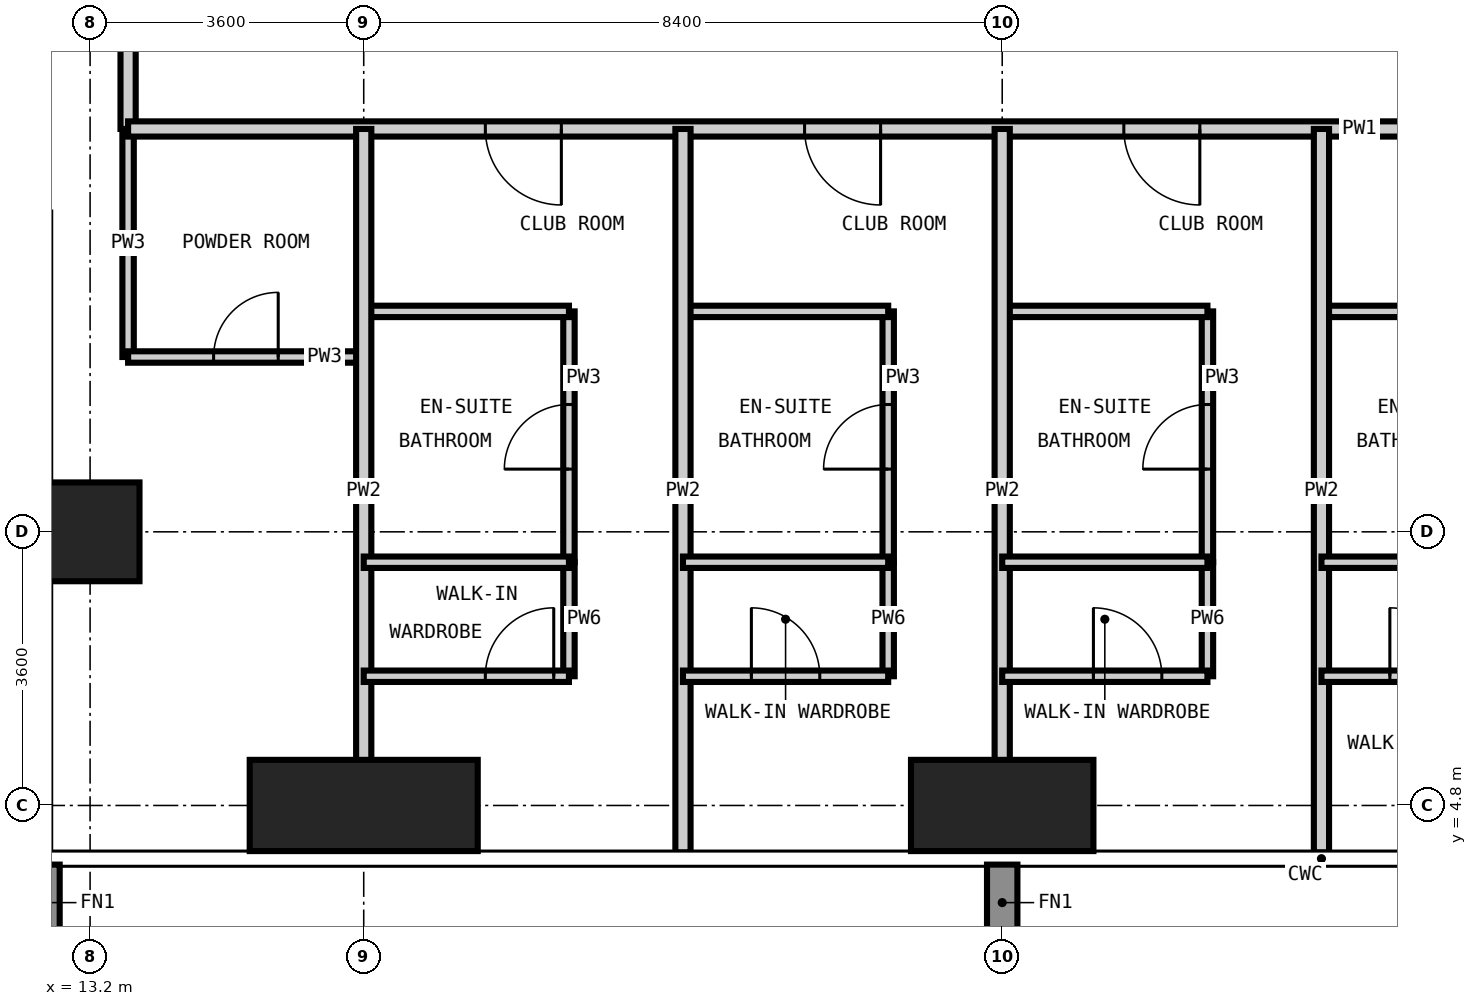
"""IFC4 building model, lengths in metres.
Left out: names, types, materials, properties, quantities, classifications, styles, units other than length and angle.
Written with IfcOpenShell. Run it as: python <this file> out.ifc"""

import sys

from ifc_helpers import new_model, si_unit, direction, frame, frame_2d, origin, origin_2d, place, context, subcontext, project, spatial, rectangle, extrude, element, fill, save


model = new_model("IFC4")
c1 = context("Model", 3, precision=1e-05, world=origin(), true_north=direction((0.0, 1.0)))
c2 = subcontext(c1, "Body", "Model", "MODEL_VIEW")
j1 = project(units=[si_unit("LENGTHUNIT", "METRE"), si_unit("PLANEANGLEUNIT", "RADIAN")], contexts=[c1])
p1 = place(None, origin())
s1 = spatial("IfcSite", under=j1, at=p1, CompositionType="ELEMENT")
p2 = place(p1, origin())
s2 = spatial("IfcBuilding", under=s1, at=p2, CompositionType="ELEMENT")
p3 = place(p2, frame((0.0, 0.0, 213.0)))
s3 = spatial("IfcBuildingStorey", under=s2, at=p3, CompositionType="ELEMENT", Elevation=213.0)
p4 = place(p3, frame((13.2, 8.4, -0.35), z_axis=(0.0, 0.0, 1.0), x_axis=(1.0, 0.0, 0.0)))
e1 = element("IfcColumn", 1, at=p4, inside=s3, PredefinedType="COLUMN", context=c2, shape_type="SweptSolid", body=[
    extrude(rectangle(XDim=1.3, YDim=1.3, at=origin_2d()), origin(), (0.0, 0.0, 1.0), 3.6),
])
p5 = place(p3, frame((16.8, 4.8, -0.35), z_axis=(0.0, 0.0, 1.0), x_axis=(1.0, 0.0, 0.0)))
e2 = element("IfcColumn", 2, at=p5, inside=s3, PredefinedType="COLUMN", context=c2, shape_type="SweptSolid", body=[
    extrude(rectangle(XDim=3.0, YDim=1.2, at=origin_2d()), origin(), (0.0, 0.0, 1.0), 3.6),
])
p6 = place(p3, frame((25.2, 4.8, -0.35), z_axis=(0.0, 0.0, 1.0), x_axis=(1.0, 0.0, 0.0)))
e3 = element("IfcColumn", 3, at=p6, inside=s3, PredefinedType="COLUMN", context=c2, shape_type="SweptSolid", body=[
    extrude(rectangle(XDim=2.4, YDim=1.2, at=origin_2d()), origin(), (0.0, 0.0, 1.0), 3.6),
])
p7 = place(p3, frame((13.7, 10.7, 0.0), z_axis=(0.0, 0.0, 1.0), x_axis=(0.0, 1.0, 0.0)))
e4 = element("IfcWall", 4, at=p7, inside=s3, PredefinedType="PARTITIONING", context=c2, shape_type="SweptSolid", body=[
    extrude(rectangle(XDim=3.0, YDim=0.15, at=frame_2d((1.5, 0.0))), origin(), (0.0, 0.0, 1.0), 3.25),
])
p8 = place(p3, frame((19.5, 8.0, 0.0), z_axis=(0.0, 0.0, 1.0), x_axis=(0.0, 1.0, 0.0)))
e5 = element("IfcWall", 5, at=p8, inside=s3, PredefinedType="PARTITIONING", context=c2, shape_type="SweptSolid", body=[
    extrude(rectangle(XDim=3.3, YDim=0.15, at=frame_2d((1.65, 0.0))), origin(), (0.0, 0.0, 1.0), 3.25),
])
p9 = place(p8, frame((1.225, 0.0, 0.0)))
e6 = element("IfcOpeningElement", 6, at=p9, cuts=e5, PredefinedType="OPENING", context=c2, shape_type="SweptSolid", body=[
    extrude(rectangle(XDim=0.85, YDim=2.1, at=frame_2d((0.425, 1.05))), frame((0.0, 0.085, 0.0), z_axis=(0.0, -1.0, 0.0), x_axis=(1.0, 0.0, 0.0)), (0.0, 0.0, 1.0), 0.17),
])
p10 = place(p3, frame((23.7, 8.0, 0.0), z_axis=(0.0, 0.0, 1.0), x_axis=(0.0, 1.0, 0.0)))
e7 = element("IfcWall", 7, at=p10, inside=s3, PredefinedType="PARTITIONING", context=c2, shape_type="SweptSolid", body=[
    extrude(rectangle(XDim=3.3, YDim=0.15, at=frame_2d((1.65, 0.0))), origin(), (0.0, 0.0, 1.0), 3.25),
])
p11 = place(p10, frame((1.225, 0.0, 0.0)))
e8 = element("IfcOpeningElement", 8, at=p11, cuts=e7, PredefinedType="OPENING", context=c2, shape_type="SweptSolid", body=[
    extrude(rectangle(XDim=0.85, YDim=2.1, at=frame_2d((0.425, 1.05))), frame((0.0, 0.085, 0.0), z_axis=(0.0, -1.0, 0.0), x_axis=(1.0, 0.0, 0.0)), (0.0, 0.0, 1.0), 0.17),
])
p12 = place(p3, frame((27.9, 8.0, 0.0), z_axis=(0.0, 0.0, 1.0), x_axis=(0.0, 1.0, 0.0)))
e9 = element("IfcWall", 9, at=p12, inside=s3, PredefinedType="PARTITIONING", context=c2, shape_type="SweptSolid", body=[
    extrude(rectangle(XDim=3.3, YDim=0.15, at=frame_2d((1.65, 0.0))), origin(), (0.0, 0.0, 1.0), 3.25),
])
p13 = place(p12, frame((1.225, 0.0, 0.0)))
e10 = element("IfcOpeningElement", 10, at=p13, cuts=e9, PredefinedType="OPENING", context=c2, shape_type="SweptSolid", body=[
    extrude(rectangle(XDim=0.85, YDim=2.1, at=frame_2d((0.425, 1.05))), frame((0.0, 0.085, 0.0), z_axis=(0.0, -1.0, 0.0), x_axis=(1.0, 0.0, 0.0)), (0.0, 0.0, 1.0), 0.17),
])
p14 = place(p3, frame((13.7, 10.7, 0.0), z_axis=(0.0, 0.0, 1.0), x_axis=(1.0, 0.0, 0.0)))
e11 = element("IfcWall", 11, at=p14, inside=s3, PredefinedType="PARTITIONING", context=c2, shape_type="SweptSolid", body=[
    extrude(rectangle(XDim=3.1, YDim=0.15, at=frame_2d((1.55, 0.0))), origin(), (0.0, 0.0, 1.0), 3.25),
])
p15 = place(p14, frame((1.125, 0.0, 0.0)))
e12 = element("IfcOpeningElement", 12, at=p15, cuts=e11, PredefinedType="OPENING", context=c2, shape_type="SweptSolid", body=[
    extrude(rectangle(XDim=0.85, YDim=2.1, at=frame_2d((0.425, 1.05))), frame((0.0, 0.085, 0.0), z_axis=(0.0, -1.0, 0.0), x_axis=(1.0, 0.0, 0.0)), (0.0, 0.0, 1.0), 0.17),
])
for number, where, z_axis, x_axis in (
    (13, (16.8, 11.3, 0.0), (0.0, 0.0, 1.0), (1.0, 0.0, 0.0)),
    (14, (21.0, 11.3, 0.0), (0.0, 0.0, 1.0), (1.0, 0.0, 0.0)),
    (15, (25.2, 11.3, 0.0), (0.0, 0.0, 1.0), (1.0, 0.0, 0.0)),
):
    element("IfcWall", number, at=place(p3, frame(where, z_axis=z_axis, x_axis=x_axis)), inside=s3, PredefinedType="PARTITIONING", context=c2, shape_type="SweptSolid", body=[
        extrude(rectangle(XDim=2.7, YDim=0.15, at=frame_2d((1.35, 0.0))), origin(), (0.0, 0.0, 1.0), 3.25),
    ])
p16 = place(p3, frame((29.4, 11.3, 0.0), z_axis=(0.0, 0.0, 1.0), x_axis=(1.0, 0.0, 0.0)))
e16 = element("IfcWall", 16, at=p16, inside=s3, PredefinedType="PARTITIONING", context=c2, shape_type="SweptSolid", body=[
    extrude(rectangle(XDim=2.7, YDim=0.15, at=frame_2d((1.35, 0.0))), origin(), (0.0, 0.0, 1.0), 3.25),
])
p17 = place(p3, frame((13.7, 13.7, 0.0), z_axis=(0.0, 0.0, 1.0), x_axis=(0.0, 1.0, 0.0)))
e17 = element("IfcWall", 17, at=p17, inside=s3, PredefinedType="PARTITIONING", context=c2, shape_type="SweptSolid", body=[
    extrude(rectangle(XDim=30.8, YDim=0.2, at=frame_2d((15.4, 0.0))), origin(), (0.0, 0.0, 1.0), 3.25),
])
p18 = place(p17, frame((4.7, 0.0, 0.0)))
e18 = element("IfcOpeningElement", 18, at=p18, cuts=e17, PredefinedType="OPENING", context=c2, shape_type="SweptSolid", body=[
    extrude(rectangle(XDim=1.0, YDim=2.2, at=frame_2d((0.5, 1.1))), frame((0.0, 0.11, 0.0), z_axis=(0.0, -1.0, 0.0), x_axis=(1.0, 0.0, 0.0)), (0.0, 0.0, 1.0), 0.22),
])
p19 = place(p17, frame((12.2, 0.0, 0.0)))
e19 = element("IfcOpeningElement", 19, at=p19, cuts=e17, PredefinedType="OPENING", context=c2, shape_type="SweptSolid", body=[
    extrude(rectangle(XDim=1.0, YDim=2.2, at=frame_2d((0.5, 1.1))), frame((0.0, 0.11, 0.0), z_axis=(0.0, -1.0, 0.0), x_axis=(1.0, 0.0, 0.0)), (0.0, 0.0, 1.0), 0.22),
])
p20 = place(p17, frame((18.2, 0.0, 0.0)))
e20 = element("IfcOpeningElement", 20, at=p20, cuts=e17, PredefinedType="OPENING", context=c2, shape_type="SweptSolid", body=[
    extrude(rectangle(XDim=1.0, YDim=2.2, at=frame_2d((0.5, 1.1))), frame((0.0, 0.11, 0.0), z_axis=(0.0, -1.0, 0.0), x_axis=(1.0, 0.0, 0.0)), (0.0, 0.0, 1.0), 0.22),
])
p21 = place(p17, frame((25.7, 0.0, 0.0)))
e21 = element("IfcOpeningElement", 21, at=p21, cuts=e17, PredefinedType="OPENING", context=c2, shape_type="SweptSolid", body=[
    extrude(rectangle(XDim=1.0, YDim=2.2, at=frame_2d((0.5, 1.1))), frame((0.0, 0.11, 0.0), z_axis=(0.0, -1.0, 0.0), x_axis=(1.0, 0.0, 0.0)), (0.0, 0.0, 1.0), 0.22),
])
p22 = place(p17, frame((1.05, 0.0, 0.0)))
e22 = element("IfcOpeningElement", 22, at=p22, cuts=e17, PredefinedType="OPENING", context=c2, shape_type="SweptSolid", body=[
    extrude(rectangle(XDim=1.0, YDim=2.2, at=frame_2d((0.5, 1.1))), frame((0.0, 0.11, 0.0), z_axis=(0.0, -1.0, 0.0), x_axis=(1.0, 0.0, 0.0)), (0.0, 0.0, 1.0), 0.22),
])
p23 = place(p17, frame((29.05, 0.0, 0.0)))
e23 = element("IfcOpeningElement", 23, at=p23, cuts=e17, PredefinedType="OPENING", context=c2, shape_type="SweptSolid", body=[
    extrude(rectangle(XDim=1.0, YDim=2.2, at=frame_2d((0.5, 1.1))), frame((0.0, 0.11, 0.0), z_axis=(0.0, -1.0, 0.0), x_axis=(1.0, 0.0, 0.0)), (0.0, 0.0, 1.0), 0.22),
])
p24 = place(p3, frame((45.7, 13.7, 0.0), z_axis=(0.0, 0.0, 1.0), x_axis=(-1.0, 0.0, 0.0)))
e24 = element("IfcWall", 24, at=p24, inside=s3, PredefinedType="PARTITIONING", context=c2, shape_type="SweptSolid", body=[
    extrude(rectangle(XDim=32.0, YDim=0.2, at=frame_2d((16.0, 0.0))), origin(), (0.0, 0.0, 1.0), 3.25),
])
p25 = place(p24, frame((26.3, 0.0, 0.0)))
e25 = element("IfcOpeningElement", 25, at=p25, cuts=e24, PredefinedType="OPENING", context=c2, shape_type="SweptSolid", body=[
    extrude(rectangle(XDim=1.0, YDim=2.2, at=frame_2d((0.5, 1.1))), frame((0.0, 0.11, 0.0), z_axis=(0.0, -1.0, 0.0), x_axis=(1.0, 0.0, 0.0)), (0.0, 0.0, 1.0), 0.22),
])
p26 = place(p24, frame((22.1, 0.0, 0.0)))
e26 = element("IfcOpeningElement", 26, at=p26, cuts=e24, PredefinedType="OPENING", context=c2, shape_type="SweptSolid", body=[
    extrude(rectangle(XDim=1.0, YDim=2.2, at=frame_2d((0.5, 1.1))), frame((0.0, 0.11, 0.0), z_axis=(0.0, -1.0, 0.0), x_axis=(1.0, 0.0, 0.0)), (0.0, 0.0, 1.0), 0.22),
])
p27 = place(p24, frame((17.9, 0.0, 0.0)))
e27 = element("IfcOpeningElement", 27, at=p27, cuts=e24, PredefinedType="OPENING", context=c2, shape_type="SweptSolid", body=[
    extrude(rectangle(XDim=1.0, YDim=2.2, at=frame_2d((0.5, 1.1))), frame((0.0, 0.11, 0.0), z_axis=(0.0, -1.0, 0.0), x_axis=(1.0, 0.0, 0.0)), (0.0, 0.0, 1.0), 0.22),
])
p28 = place(p24, frame((13.7, 0.0, 0.0)))
e28 = element("IfcOpeningElement", 28, at=p28, cuts=e24, PredefinedType="OPENING", context=c2, shape_type="SweptSolid", body=[
    extrude(rectangle(XDim=1.0, YDim=2.2, at=frame_2d((0.5, 1.1))), frame((0.0, 0.11, 0.0), z_axis=(0.0, -1.0, 0.0), x_axis=(1.0, 0.0, 0.0)), (0.0, 0.0, 1.0), 0.22),
])
p29 = place(p24, frame((9.5, 0.0, 0.0)))
e29 = element("IfcOpeningElement", 29, at=p29, cuts=e24, PredefinedType="OPENING", context=c2, shape_type="SweptSolid", body=[
    extrude(rectangle(XDim=1.0, YDim=2.2, at=frame_2d((0.5, 1.1))), frame((0.0, 0.11, 0.0), z_axis=(0.0, -1.0, 0.0), x_axis=(1.0, 0.0, 0.0)), (0.0, 0.0, 1.0), 0.22),
])
p30 = place(p24, frame((5.3, 0.0, 0.0)))
e30 = element("IfcOpeningElement", 30, at=p30, cuts=e24, PredefinedType="OPENING", context=c2, shape_type="SweptSolid", body=[
    extrude(rectangle(XDim=1.0, YDim=2.2, at=frame_2d((0.5, 1.1))), frame((0.0, 0.11, 0.0), z_axis=(0.0, -1.0, 0.0), x_axis=(1.0, 0.0, 0.0)), (0.0, 0.0, 1.0), 0.22),
])
for number, where, z_axis, x_axis in (
    (31, (16.8, 4.182, 0.0), (0.0, 0.0, 1.0), (0.0, 1.0, 0.0)),
    (32, (21.0, 4.182, 0.0), (0.0, 0.0, 1.0), (0.0, 1.0, 0.0)),
    (33, (25.2, 4.182, 0.0), (0.0, 0.0, 1.0), (0.0, 1.0, 0.0)),
    (34, (29.4, 4.182, 0.0), (0.0, 0.0, 1.0), (0.0, 1.0, 0.0)),
):
    element("IfcWall", number, at=place(p3, frame(where, z_axis=z_axis, x_axis=x_axis)), inside=s3, PredefinedType="PARTITIONING", context=c2, shape_type="SweptSolid", body=[
        extrude(rectangle(XDim=9.518, YDim=0.2, at=frame_2d((4.759, 0.0))), origin(), (0.0, 0.0, 1.0), 3.25),
    ])
for number, where, z_axis, x_axis in (
    (35, (19.5, 6.5, 0.0), (0.0, 0.0, 1.0), (0.0, 1.0, 0.0)),
    (36, (23.7, 6.5, 0.0), (0.0, 0.0, 1.0), (0.0, 1.0, 0.0)),
    (37, (27.9, 6.5, 0.0), (0.0, 0.0, 1.0), (0.0, 1.0, 0.0)),
):
    element("IfcWall", number, at=place(p3, frame(where, z_axis=z_axis, x_axis=x_axis)), inside=s3, PredefinedType="PARTITIONING", context=c2, shape_type="SweptSolid", body=[
        extrude(rectangle(XDim=1.5, YDim=0.15, at=frame_2d((0.75, 0.0))), origin(), (0.0, 0.0, 1.0), 3.25),
    ])
p31 = place(p3, frame((16.8, 6.5, 0.0), z_axis=(0.0, 0.0, 1.0), x_axis=(1.0, 0.0, 0.0)))
e38 = element("IfcWall", 38, at=p31, inside=s3, PredefinedType="PARTITIONING", context=c2, shape_type="SweptSolid", body=[
    extrude(rectangle(XDim=2.7, YDim=0.15, at=frame_2d((1.35, 0.0))), origin(), (0.0, 0.0, 1.0), 3.25),
])
p32 = place(p31, frame((1.6, 0.0, 0.0)))
e39 = element("IfcOpeningElement", 39, at=p32, cuts=e38, PredefinedType="OPENING", context=c2, shape_type="SweptSolid", body=[
    extrude(rectangle(XDim=0.9, YDim=2.1, at=frame_2d((0.45, 1.05))), frame((0.0, 0.085, 0.0), z_axis=(0.0, -1.0, 0.0), x_axis=(1.0, 0.0, 0.0)), (0.0, 0.0, 1.0), 0.17),
])
p33 = place(p3, frame((21.0, 6.5, 0.0), z_axis=(0.0, 0.0, 1.0), x_axis=(1.0, 0.0, 0.0)))
e40 = element("IfcWall", 40, at=p33, inside=s3, PredefinedType="PARTITIONING", context=c2, shape_type="SweptSolid", body=[
    extrude(rectangle(XDim=2.7, YDim=0.15, at=frame_2d((1.35, 0.0))), origin(), (0.0, 0.0, 1.0), 3.25),
])
p34 = place(p33, frame((0.9, 0.0, 0.0)))
e41 = element("IfcOpeningElement", 41, at=p34, cuts=e40, PredefinedType="OPENING", context=c2, shape_type="SweptSolid", body=[
    extrude(rectangle(XDim=0.9, YDim=2.1, at=frame_2d((0.45, 1.05))), frame((0.0, 0.085, 0.0), z_axis=(0.0, -1.0, 0.0), x_axis=(1.0, 0.0, 0.0)), (0.0, 0.0, 1.0), 0.17),
])
p35 = place(p3, frame((25.2, 6.5, 0.0), z_axis=(0.0, 0.0, 1.0), x_axis=(1.0, 0.0, 0.0)))
e42 = element("IfcWall", 42, at=p35, inside=s3, PredefinedType="PARTITIONING", context=c2, shape_type="SweptSolid", body=[
    extrude(rectangle(XDim=2.7, YDim=0.15, at=frame_2d((1.35, 0.0))), origin(), (0.0, 0.0, 1.0), 3.25),
])
p36 = place(p35, frame((1.2, 0.0, 0.0)))
e43 = element("IfcOpeningElement", 43, at=p36, cuts=e42, PredefinedType="OPENING", context=c2, shape_type="SweptSolid", body=[
    extrude(rectangle(XDim=0.9, YDim=2.1, at=frame_2d((0.45, 1.05))), frame((0.0, 0.085, 0.0), z_axis=(0.0, -1.0, 0.0), x_axis=(1.0, 0.0, 0.0)), (0.0, 0.0, 1.0), 0.17),
])
p37 = place(p3, frame((29.4, 6.5, 0.0), z_axis=(0.0, 0.0, 1.0), x_axis=(1.0, 0.0, 0.0)))
e44 = element("IfcWall", 44, at=p37, inside=s3, PredefinedType="PARTITIONING", context=c2, shape_type="SweptSolid", body=[
    extrude(rectangle(XDim=2.7, YDim=0.15, at=frame_2d((1.35, 0.0))), origin(), (0.0, 0.0, 1.0), 3.25),
])
p38 = place(p37, frame((0.9, 0.0, 0.0)))
e45 = element("IfcOpeningElement", 45, at=p38, cuts=e44, PredefinedType="OPENING", context=c2, shape_type="SweptSolid", body=[
    extrude(rectangle(XDim=0.9, YDim=2.1, at=frame_2d((0.45, 1.05))), frame((0.0, 0.085, 0.0), z_axis=(0.0, -1.0, 0.0), x_axis=(1.0, 0.0, 0.0)), (0.0, 0.0, 1.0), 0.17),
])
for number, where, z_axis, x_axis in (
    (46, (16.8, 8.0, 0.0), (0.0, 0.0, 1.0), (1.0, 0.0, 0.0)),
    (47, (21.0, 8.0, 0.0), (0.0, 0.0, 1.0), (1.0, 0.0, 0.0)),
    (48, (25.2, 8.0, 0.0), (0.0, 0.0, 1.0), (1.0, 0.0, 0.0)),
):
    element("IfcWall", number, at=place(p3, frame(where, z_axis=z_axis, x_axis=x_axis)), inside=s3, PredefinedType="PARTITIONING", context=c2, shape_type="SweptSolid", body=[
        extrude(rectangle(XDim=2.7, YDim=0.15, at=frame_2d((1.35, 0.0))), origin(), (0.0, 0.0, 1.0), 3.25),
    ])
p39 = place(p3, frame((29.4, 8.0, 0.0), z_axis=(0.0, 0.0, 1.0), x_axis=(1.0, 0.0, 0.0)))
e49 = element("IfcWall", 49, at=p39, inside=s3, PredefinedType="PARTITIONING", context=c2, shape_type="SweptSolid", body=[
    extrude(rectangle(XDim=2.7, YDim=0.15, at=frame_2d((1.35, 0.0))), origin(), (0.0, 0.0, 1.0), 3.25),
])
p40 = place(p25, origin())
e50 = element("IfcDoor", 50, at=p40, inside=s3, OperationType="SINGLE_SWING_LEFT", PredefinedType="DOOR", context=c2, shape_type="SweptSolid", body=[
    extrude(rectangle(XDim=1.0, YDim=2.2, at=frame_2d((0.5, 1.1))), frame((0.0, 0.025, 0.0), z_axis=(0.0, -1.0, 0.0), x_axis=(1.0, 0.0, 0.0)), (0.0, 0.0, 1.0), 0.05),
])
fill(e25, e50)
p41 = place(p9, origin())
e51 = element("IfcDoor", 51, at=p41, inside=s3, OperationType="SINGLE_SWING_LEFT", PredefinedType="DOOR", context=c2, shape_type="SweptSolid", body=[
    extrude(rectangle(XDim=0.85, YDim=2.1, at=frame_2d((0.425, 1.05))), frame((0.0, 0.025, 0.0), z_axis=(0.0, -1.0, 0.0), x_axis=(1.0, 0.0, 0.0)), (0.0, 0.0, 1.0), 0.05),
])
fill(e6, e51)
p42 = place(p32, origin())
e52 = element("IfcDoor", 52, at=p42, inside=s3, OperationType="SINGLE_SWING_RIGHT", PredefinedType="DOOR", context=c2, shape_type="SweptSolid", body=[
    extrude(rectangle(XDim=0.9, YDim=2.1, at=frame_2d((0.45, 1.05))), frame((0.0, 0.025, 0.0), z_axis=(0.0, -1.0, 0.0), x_axis=(1.0, 0.0, 0.0)), (0.0, 0.0, 1.0), 0.05),
])
fill(e39, e52)
p43 = place(p26, origin())
e53 = element("IfcDoor", 53, at=p43, inside=s3, OperationType="SINGLE_SWING_LEFT", PredefinedType="DOOR", context=c2, shape_type="SweptSolid", body=[
    extrude(rectangle(XDim=1.0, YDim=2.2, at=frame_2d((0.5, 1.1))), frame((0.0, 0.025, 0.0), z_axis=(0.0, -1.0, 0.0), x_axis=(1.0, 0.0, 0.0)), (0.0, 0.0, 1.0), 0.05),
])
fill(e26, e53)
p44 = place(p11, origin())
e54 = element("IfcDoor", 54, at=p44, inside=s3, OperationType="SINGLE_SWING_LEFT", PredefinedType="DOOR", context=c2, shape_type="SweptSolid", body=[
    extrude(rectangle(XDim=0.85, YDim=2.1, at=frame_2d((0.425, 1.05))), frame((0.0, 0.025, 0.0), z_axis=(0.0, -1.0, 0.0), x_axis=(1.0, 0.0, 0.0)), (0.0, 0.0, 1.0), 0.05),
])
fill(e8, e54)
p45 = place(p34, origin())
e55 = element("IfcDoor", 55, at=p45, inside=s3, OperationType="SINGLE_SWING_LEFT", PredefinedType="DOOR", context=c2, shape_type="SweptSolid", body=[
    extrude(rectangle(XDim=0.9, YDim=2.1, at=frame_2d((0.45, 1.05))), frame((0.0, 0.025, 0.0), z_axis=(0.0, -1.0, 0.0), x_axis=(1.0, 0.0, 0.0)), (0.0, 0.0, 1.0), 0.05),
])
fill(e41, e55)
p46 = place(p27, origin())
e56 = element("IfcDoor", 56, at=p46, inside=s3, OperationType="SINGLE_SWING_LEFT", PredefinedType="DOOR", context=c2, shape_type="SweptSolid", body=[
    extrude(rectangle(XDim=1.0, YDim=2.2, at=frame_2d((0.5, 1.1))), frame((0.0, 0.025, 0.0), z_axis=(0.0, -1.0, 0.0), x_axis=(1.0, 0.0, 0.0)), (0.0, 0.0, 1.0), 0.05),
])
fill(e27, e56)
p47 = place(p13, origin())
e57 = element("IfcDoor", 57, at=p47, inside=s3, OperationType="SINGLE_SWING_LEFT", PredefinedType="DOOR", context=c2, shape_type="SweptSolid", body=[
    extrude(rectangle(XDim=0.85, YDim=2.1, at=frame_2d((0.425, 1.05))), frame((0.0, 0.025, 0.0), z_axis=(0.0, -1.0, 0.0), x_axis=(1.0, 0.0, 0.0)), (0.0, 0.0, 1.0), 0.05),
])
fill(e10, e57)
p48 = place(p36, origin())
e58 = element("IfcDoor", 58, at=p48, inside=s3, OperationType="SINGLE_SWING_LEFT", PredefinedType="DOOR", context=c2, shape_type="SweptSolid", body=[
    extrude(rectangle(XDim=0.9, YDim=2.1, at=frame_2d((0.45, 1.05))), frame((0.0, 0.025, 0.0), z_axis=(0.0, -1.0, 0.0), x_axis=(1.0, 0.0, 0.0)), (0.0, 0.0, 1.0), 0.05),
])
fill(e43, e58)
p49 = place(p38, origin())
e59 = element("IfcDoor", 59, at=p49, inside=s3, OperationType="SINGLE_SWING_LEFT", PredefinedType="DOOR", context=c2, shape_type="SweptSolid", body=[
    extrude(rectangle(XDim=0.9, YDim=2.1, at=frame_2d((0.45, 1.05))), frame((0.0, 0.025, 0.0), z_axis=(0.0, -1.0, 0.0), x_axis=(1.0, 0.0, 0.0)), (0.0, 0.0, 1.0), 0.05),
])
fill(e45, e59)
p50 = place(p15, origin())
e60 = element("IfcDoor", 60, at=p50, inside=s3, OperationType="SINGLE_SWING_RIGHT", PredefinedType="DOOR", context=c2, shape_type="SweptSolid", body=[
    extrude(rectangle(XDim=0.85, YDim=2.1, at=frame_2d((0.425, 1.05))), frame((0.0, 0.025, 0.0), z_axis=(0.0, -1.0, 0.0), x_axis=(1.0, 0.0, 0.0)), (0.0, 0.0, 1.0), 0.05),
])
fill(e12, e60)
save(model, sys.argv[1])
